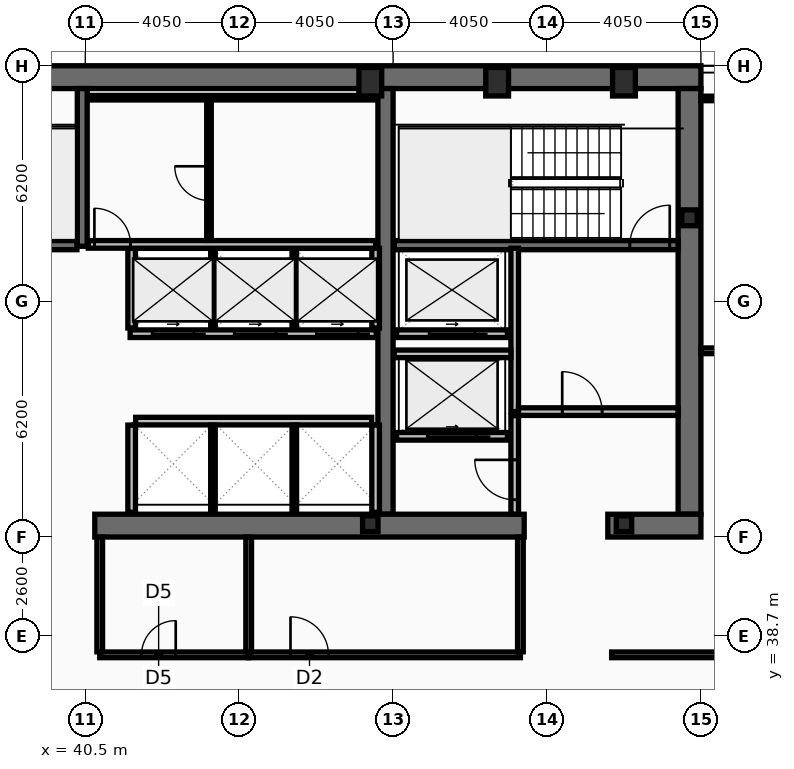
"""IFC4 building model, lengths in metres.
Left out: names, types, materials, properties, quantities, classifications, styles, units other than length and angle.
Written with IfcOpenShell. Run it as: python <this file> out.ifc"""

import sys

from ifc_helpers import new_model, si_unit, direction, frame, frame_2d, origin, origin_2d, place, context, subcontext, project, spatial, rectangle, hollow_rectangle, i_section, extrude, element, fill, save


model = new_model("IFC4")
c1 = context("Model", 3, precision=1e-05, world=origin(), true_north=direction((0.0, 1.0)))
c2 = subcontext(c1, "Body", "Model", "MODEL_VIEW")
j1 = project(units=[si_unit("LENGTHUNIT", "METRE"), si_unit("PLANEANGLEUNIT", "RADIAN")], contexts=[c1])
p1 = place(None, origin())
s1 = spatial("IfcSite", under=j1, at=p1, CompositionType="ELEMENT")
p2 = place(p1, origin())
s2 = spatial("IfcBuilding", under=s1, at=p2, CompositionType="ELEMENT")
p3 = place(p2, frame((0.0, 0.0, 188.6)))
s3 = spatial("IfcBuildingStorey", under=s2, at=p3, CompositionType="ELEMENT", Elevation=188.6)
p4 = place(p3, frame((16.2, 53.4, 0.0), z_axis=(0.0, 0.0, 1.0), x_axis=(1.0, 0.0, 0.0)))
e1 = element("IfcWall", 1, at=p4, inside=s3, PredefinedType="SHEAR", context=c2, shape_type="SweptSolid", body=[
    extrude(rectangle(XDim=40.5, YDim=0.6, at=frame_2d((20.25, 0.0))), origin(), (0.0, 0.0, 1.0), 3.44),
])
p5 = place(p3, frame((56.4, 53.1, 0.0), z_axis=(0.0, 0.0, 1.0), x_axis=(0.0, -1.0, 0.0)))
e2 = element("IfcWall", 2, at=p5, inside=s3, PredefinedType="SHEAR", context=c2, shape_type="SweptSolid", body=[
    extrude(rectangle(XDim=11.2, YDim=0.6, at=frame_2d((5.6, 0.0))), origin(), (0.0, 0.0, 1.0), 3.44),
])
p6 = place(p3, frame((48.4, 41.9, 0.0), z_axis=(0.0, 0.0, 1.0), x_axis=(0.0, 1.0, 0.0)))
e3 = element("IfcWall", 3, at=p6, inside=s3, PredefinedType="SHEAR", context=c2, shape_type="SweptSolid", body=[
    extrude(rectangle(XDim=11.2, YDim=0.4, at=frame_2d((5.6, 0.0))), origin(), (0.0, 0.0, 1.0), 3.44),
])
p7 = place(p3, frame((52.05, 41.6, 0.0), z_axis=(0.0, 0.0, 1.0), x_axis=(-1.0, 0.0, 0.0)))
e4 = element("IfcWall", 4, at=p7, inside=s3, PredefinedType="SHEAR", context=c2, shape_type="SweptSolid", body=[
    extrude(rectangle(XDim=11.3, YDim=0.6, at=frame_2d((5.65, 0.0))), origin(), (0.0, 0.0, 1.0), 3.44),
])
p8 = place(p3, frame((56.7, 41.6, 0.0), z_axis=(0.0, 0.0, 1.0), x_axis=(-1.0, 0.0, 0.0)))
e5 = element("IfcWall", 5, at=p8, inside=s3, PredefinedType="SHEAR", context=c2, shape_type="SweptSolid", body=[
    extrude(rectangle(XDim=2.45, YDim=0.6, at=frame_2d((1.225, 0.0))), origin(), (0.0, 0.0, 1.0), 3.44),
])
p9 = place(p3, frame((40.42, 48.95, 0.0), z_axis=(0.0, 0.0, 1.0), x_axis=(0.0, 1.0, 0.0)))
e6 = element("IfcWall", 6, at=p9, inside=s3, PredefinedType="SHEAR", context=c2, shape_type="SweptSolid", body=[
    extrude(rectangle(XDim=4.15, YDim=0.26, at=frame_2d((2.075, 0.0))), origin(), (0.0, 0.0, 1.0), 3.44),
])
p10 = place(p3, frame((48.63, 48.98, 0.0), z_axis=(0.0, 0.0, 1.0), x_axis=(1.0, 0.0, 0.0)))
e7 = element("IfcWall", 7, at=p10, inside=s3, PredefinedType="SHEAR", context=c2, shape_type="SweptSolid", body=[
    extrude(rectangle(XDim=7.47, YDim=0.24, at=frame_2d((3.735, 0.0))), origin(), (0.0, 0.0, 1.0), 3.44),
])
p11 = place(p10, frame((6.2, 0.0, 0.0)))
e8 = element("IfcOpeningElement", 8, at=p11, cuts=e7, PredefinedType="OPENING", context=c2, shape_type="SweptSolid", body=[
    extrude(rectangle(XDim=1.05, YDim=2.15, at=frame_2d((0.525, 1.075))), frame((0.0, 0.13, 0.0), z_axis=(0.0, -1.0, 0.0), x_axis=(1.0, 0.0, 0.0)), (0.0, 0.0, 1.0), 0.26),
])
p12 = place(p3, frame((32.72, 48.98, 0.0), z_axis=(0.0, 0.0, 1.0), x_axis=(1.0, 0.0, 0.0)))
e9 = element("IfcWall", 9, at=p12, inside=s3, PredefinedType="SHEAR", context=c2, shape_type="SweptSolid", body=[
    extrude(rectangle(XDim=7.56, YDim=0.24, at=frame_2d((3.78, 0.0))), origin(), (0.0, 0.0, 1.0), 3.44),
])
p13 = place(p12, frame((0.22, 0.0, 0.0)))
e10 = element("IfcOpeningElement", 10, at=p13, cuts=e9, PredefinedType="OPENING", context=c2, shape_type="SweptSolid", body=[
    extrude(rectangle(XDim=1.05, YDim=2.15, at=frame_2d((0.525, 1.075))), frame((0.0, 0.13, 0.0), z_axis=(0.0, -1.0, 0.0), x_axis=(1.0, 0.0, 0.0)), (0.0, 0.0, 1.0), 0.26),
])
for number, where, z_axis, x_axis in (
    (11, (48.0, 53.28, 0.0), (0.0, 0.0, 1.0), (1.0, 0.0, 0.0)),
    (12, (51.337, 53.28, 0.0), (0.0, 0.0, 1.0), (1.0, 0.0, 0.0)),
    (13, (54.675, 53.28, 0.0), (0.0, 0.0, 1.0), (1.0, 0.0, 0.0)),
):
    element("IfcColumn", number, at=place(p3, frame(where, z_axis=z_axis, x_axis=x_axis)), inside=s3, PredefinedType="COLUMN", context=c2, shape_type="SweptSolid", body=[
        extrude(hollow_rectangle(XDim=0.6, YDim=0.75, WallThickness=0.045, at=origin_2d()), origin(), (0.0, 0.0, 1.0), 3.6),
    ])
for number, where, z_axis, x_axis in (
    (14, (56.4, 49.7, 0.0), (0.0, 0.0, 1.0), (1.0, 0.0, 0.0)),
    (15, (48.0, 41.65, 0.0), (0.0, 0.0, 1.0), (1.0, 0.0, 0.0)),
    (16, (54.675, 41.65, 0.0), (0.0, 0.0, 1.0), (1.0, 0.0, 0.0)),
):
    element("IfcColumn", number, at=place(p3, frame(where, z_axis=z_axis, x_axis=x_axis)), inside=s3, PredefinedType="COLUMN", context=c2, shape_type="SweptSolid", body=[
        extrude(i_section(OverallWidth=0.406, OverallDepth=0.416, WebThickness=0.03, FlangeThickness=0.048, at=origin_2d()), origin(), (0.0, 0.0, 1.0), 3.6),
    ])
p14 = place(p3, frame((51.61, 43.95, 0.0), z_axis=(0.0, 0.0, 1.0), x_axis=(-1.0, 0.0, 0.0)))
e17 = element("IfcWall", 17, at=p14, inside=s3, PredefinedType="PARTITIONING", context=c2, shape_type="SweptSolid", body=[
    extrude(rectangle(XDim=2.92, YDim=0.2, at=frame_2d((1.46, 0.0))), origin(), (0.0, 0.0, 1.0), 3.44),
])
p15 = place(p14, frame((0.81, 0.0, 0.0)))
e18 = element("IfcOpeningElement", 18, at=p15, cuts=e17, PredefinedType="OPENING", context=c2, shape_type="SweptSolid", body=[
    extrude(rectangle(XDim=1.3, YDim=2.18, at=frame_2d((0.65, 1.09))), frame((0.0, 0.11, 0.0), z_axis=(0.0, -1.0, 0.0), x_axis=(1.0, 0.0, 0.0)), (0.0, 0.0, 1.0), 0.22),
])
p16 = place(p3, frame((51.61, 46.65, 0.0), z_axis=(0.0, 0.0, 1.0), x_axis=(-1.0, 0.0, 0.0)))
e19 = element("IfcWall", 19, at=p16, inside=s3, PredefinedType="PARTITIONING", context=c2, shape_type="SweptSolid", body=[
    extrude(rectangle(XDim=2.92, YDim=0.2, at=frame_2d((1.46, 0.0))), origin(), (0.0, 0.0, 1.0), 3.44),
])
p17 = place(p16, frame((0.86, 0.0, 0.0)))
e20 = element("IfcOpeningElement", 20, at=p17, cuts=e19, PredefinedType="OPENING", context=c2, shape_type="SweptSolid", body=[
    extrude(rectangle(XDim=1.2, YDim=2.18, at=frame_2d((0.6, 1.09))), frame((0.0, 0.11, 0.0), z_axis=(0.0, -1.0, 0.0), x_axis=(1.0, 0.0, 0.0)), (0.0, 0.0, 1.0), 0.22),
])
p18 = place(p3, frame((48.16, 46.65, 0.0), z_axis=(0.0, 0.0, 1.0), x_axis=(-1.0, 0.0, 0.0)))
e21 = element("IfcWall", 21, at=p18, inside=s3, PredefinedType="PARTITIONING", context=c2, shape_type="SweptSolid", body=[
    extrude(rectangle(XDim=6.48, YDim=0.2, at=frame_2d((3.24, 0.0))), origin(), (0.0, 0.0, 1.0), 3.44),
])
p19 = place(p18, frame((4.8, 0.0, 0.0)))
e22 = element("IfcOpeningElement", 22, at=p19, cuts=e21, PredefinedType="OPENING", context=c2, shape_type="SweptSolid", body=[
    extrude(rectangle(XDim=1.1, YDim=2.18, at=frame_2d((0.55, 1.09))), frame((0.0, 0.11, 0.0), z_axis=(0.0, -1.0, 0.0), x_axis=(1.0, 0.0, 0.0)), (0.0, 0.0, 1.0), 0.22),
])
p20 = place(p18, frame((2.64, 0.0, 0.0)))
e23 = element("IfcOpeningElement", 23, at=p20, cuts=e21, PredefinedType="OPENING", context=c2, shape_type="SweptSolid", body=[
    extrude(rectangle(XDim=1.1, YDim=2.18, at=frame_2d((0.55, 1.09))), frame((0.0, 0.11, 0.0), z_axis=(0.0, -1.0, 0.0), x_axis=(1.0, 0.0, 0.0)), (0.0, 0.0, 1.0), 0.22),
])
p21 = place(p18, frame((0.48, 0.0, 0.0)))
e24 = element("IfcOpeningElement", 24, at=p21, cuts=e21, PredefinedType="OPENING", context=c2, shape_type="SweptSolid", body=[
    extrude(rectangle(XDim=1.1, YDim=2.18, at=frame_2d((0.55, 1.09))), frame((0.0, 0.11, 0.0), z_axis=(0.0, -1.0, 0.0), x_axis=(1.0, 0.0, 0.0)), (0.0, 0.0, 1.0), 0.22),
])
p22 = place(p3, frame((51.8, 44.6, 0.0), z_axis=(0.0, 0.0, 1.0), x_axis=(0.0, 1.0, 0.0)))
e25 = element("IfcWall", 25, at=p22, inside=s3, PredefinedType="PARTITIONING", context=c2, shape_type="SweptSolid", body=[
    extrude(rectangle(XDim=4.3, YDim=0.2, at=frame_2d((2.15, 0.0))), origin(), (0.0, 0.0, 1.0), 3.44),
])
p23 = place(p3, frame((51.9, 44.6, 0.0), z_axis=(0.0, 0.0, 1.0), x_axis=(1.0, 0.0, 0.0)))
e26 = element("IfcWall", 26, at=p23, inside=s3, PredefinedType="PARTITIONING", context=c2, shape_type="SweptSolid", body=[
    extrude(rectangle(XDim=4.2, YDim=0.2, at=frame_2d((2.1, 0.0))), origin(), (0.0, 0.0, 1.0), 3.44),
])
p24 = place(p23, frame((1.15, 0.0, 0.0)))
e27 = element("IfcOpeningElement", 27, at=p24, cuts=e26, PredefinedType="OPENING", context=c2, shape_type="SweptSolid", body=[
    extrude(rectangle(XDim=1.05, YDim=2.15, at=frame_2d((0.525, 1.075))), frame((0.0, 0.11, 0.0), z_axis=(0.0, -1.0, 0.0), x_axis=(1.0, 0.0, 0.0)), (0.0, 0.0, 1.0), 0.22),
])
p25 = place(p3, frame((48.63, 46.12, 0.0), z_axis=(0.0, 0.0, 1.0), x_axis=(1.0, 0.0, 0.0)))
e28 = element("IfcWall", 28, at=p25, inside=s3, PredefinedType="PARTITIONING", context=c2, shape_type="SweptSolid", body=[
    extrude(rectangle(XDim=3.07, YDim=0.2, at=frame_2d((1.535, 0.0))), origin(), (0.0, 0.0, 1.0), 3.44),
])
p26 = place(p3, frame((51.8, 41.9, 0.0), z_axis=(0.0, 0.0, 1.0), x_axis=(0.0, 1.0, 0.0)))
e29 = element("IfcWall", 29, at=p26, inside=s3, PredefinedType="PARTITIONING", context=c2, shape_type="SweptSolid", body=[
    extrude(rectangle(XDim=2.595, YDim=0.2, at=frame_2d((1.298, 0.0))), origin(), (0.0, 0.0, 1.0), 3.44),
])
p27 = place(p26, frame((0.38, 0.0, 0.0)))
e30 = element("IfcOpeningElement", 30, at=p27, cuts=e29, PredefinedType="OPENING", context=c2, shape_type="SweptSolid", body=[
    extrude(rectangle(XDim=1.05, YDim=2.15, at=frame_2d((0.525, 1.075))), frame((0.0, 0.11, 0.0), z_axis=(0.0, -1.0, 0.0), x_axis=(1.0, 0.0, 0.0)), (0.0, 0.0, 1.0), 0.22),
])
for number, where, z_axis, x_axis in (
    (31, (41.72, 46.8, 0.0), (0.0, 0.0, 1.0), (0.0, 1.0, 0.0)),
    (32, (48.14, 46.8, 0.0), (0.0, 0.0, 1.0), (0.0, 1.0, 0.0)),
):
    element("IfcWall", number, at=place(p3, frame(where, z_axis=z_axis, x_axis=x_axis)), inside=s3, PredefinedType="PARTITIONING", context=c2, shape_type="SweptSolid", body=[
        extrude(rectangle(XDim=2.095, YDim=0.2, at=frame_2d((1.047, 0.0))), origin(), (0.0, 0.0, 1.0), 3.44),
    ])
for number, where, z_axis, x_axis in (
    (33, (43.86, 46.8, 0.0), (0.0, 0.0, 1.0), (0.0, 1.0, 0.0)),
    (34, (46.0, 46.8, 0.0), (0.0, 0.0, 1.0), (0.0, 1.0, 0.0)),
):
    element("IfcWall", number, at=place(p3, frame(where, z_axis=z_axis, x_axis=x_axis)), inside=s3, PredefinedType="PARTITIONING", context=c2, shape_type="SweptSolid", body=[
        extrude(rectangle(XDim=2.095, YDim=0.12, at=frame_2d((1.047, 0.0))), origin(), (0.0, 0.0, 1.0), 3.44),
    ])
p28 = place(p3, frame((41.825, 44.35, 0.0), z_axis=(0.0, 0.0, 1.0), x_axis=(1.0, 0.0, 0.0)))
e35 = element("IfcWall", 35, at=p28, inside=s3, PredefinedType="PARTITIONING", context=c2, shape_type="SweptSolid", body=[
    extrude(rectangle(XDim=6.21, YDim=0.2, at=frame_2d((3.105, 0.0))), origin(), (0.0, 0.0, 1.0), 3.44),
])
for number, where, z_axis, x_axis in (
    (36, (41.72, 41.95, 0.0), (0.0, 0.0, 1.0), (0.0, 1.0, 0.0)),
    (37, (48.14, 41.95, 0.0), (0.0, 0.0, 1.0), (0.0, 1.0, 0.0)),
):
    element("IfcWall", number, at=place(p3, frame(where, z_axis=z_axis, x_axis=x_axis)), inside=s3, PredefinedType="PARTITIONING", context=c2, shape_type="SweptSolid", body=[
        extrude(rectangle(XDim=2.295, YDim=0.2, at=frame_2d((1.147, 0.0))), origin(), (0.0, 0.0, 1.0), 3.44),
    ])
for number, where, z_axis, x_axis in (
    (38, (43.86, 41.95, 0.0), (0.0, 0.0, 1.0), (0.0, 1.0, 0.0)),
    (39, (46.0, 41.95, 0.0), (0.0, 0.0, 1.0), (0.0, 1.0, 0.0)),
):
    element("IfcWall", number, at=place(p3, frame(where, z_axis=z_axis, x_axis=x_axis)), inside=s3, PredefinedType="PARTITIONING", context=c2, shape_type="SweptSolid", body=[
        extrude(rectangle(XDim=2.295, YDim=0.12, at=frame_2d((1.147, 0.0))), origin(), (0.0, 0.0, 1.0), 3.44),
    ])
p29 = place(p3, frame((40.58, 52.86, 0.0), z_axis=(0.0, 0.0, 1.0), x_axis=(1.0, 0.0, 0.0)))
e40 = element("IfcWall", 40, at=p29, inside=s3, PredefinedType="PARTITIONING", context=c2, shape_type="SweptSolid", body=[
    extrude(rectangle(XDim=7.56, YDim=0.12, at=frame_2d((3.78, 0.0))), origin(), (0.0, 0.0, 1.0), 3.44),
])
p30 = place(p3, frame((40.58, 49.0, 0.0), z_axis=(0.0, 0.0, 1.0), x_axis=(1.0, 0.0, 0.0)))
e41 = element("IfcWall", 41, at=p30, inside=s3, PredefinedType="PARTITIONING", context=c2, shape_type="SweptSolid", body=[
    extrude(rectangle(XDim=7.56, YDim=0.2, at=frame_2d((3.78, 0.0))), origin(), (0.0, 0.0, 1.0), 3.44),
])
p31 = place(p30, frame((0.16, 0.0, 0.0)))
e42 = element("IfcOpeningElement", 42, at=p31, cuts=e41, PredefinedType="OPENING", context=c2, shape_type="SweptSolid", body=[
    extrude(rectangle(XDim=0.95, YDim=2.1, at=frame_2d((0.475, 1.05))), frame((0.0, 0.11, 0.0), z_axis=(0.0, -1.0, 0.0), x_axis=(1.0, 0.0, 0.0)), (0.0, 0.0, 1.0), 0.22),
])
p32 = place(p3, frame((43.755, 49.105, 0.0), z_axis=(0.0, 0.0, 1.0), x_axis=(0.0, 1.0, 0.0)))
e43 = element("IfcWall", 43, at=p32, inside=s3, PredefinedType="PARTITIONING", context=c2, shape_type="SweptSolid", body=[
    extrude(rectangle(XDim=3.69, YDim=0.12, at=frame_2d((1.845, 0.0))), origin(), (0.0, 0.0, 1.0), 3.44),
])
p33 = place(p32, frame((1.05, 0.0, 0.0)))
e44 = element("IfcOpeningElement", 44, at=p33, cuts=e43, PredefinedType="OPENING", context=c2, shape_type="SweptSolid", body=[
    extrude(rectangle(XDim=0.9, YDim=2.05, at=frame_2d((0.45, 1.025))), frame((0.0, 0.07, 0.0), z_axis=(0.0, -1.0, 0.0), x_axis=(1.0, 0.0, 0.0)), (0.0, 0.0, 1.0), 0.14),
])
p34 = place(p3, frame((40.88, 38.2, 0.0), z_axis=(0.0, 0.0, 1.0), x_axis=(1.0, 0.0, 0.0)))
e45 = element("IfcWall", 45, at=p34, inside=s3, PredefinedType="PARTITIONING", context=c2, shape_type="SweptSolid", body=[
    extrude(rectangle(XDim=3.92, YDim=0.15, at=frame_2d((1.96, 0.0))), origin(), (0.0, 0.0, 1.0), 2.73),
])
p35 = place(p34, frame((1.1, 0.0, 0.0)))
e46 = element("IfcOpeningElement", 46, at=p35, cuts=e45, PredefinedType="OPENING", context=c2, shape_type="SweptSolid", body=[
    extrude(rectangle(XDim=0.9, YDim=2.05, at=frame_2d((0.45, 1.025))), frame((0.0, 0.085, 0.0), z_axis=(0.0, -1.0, 0.0), x_axis=(1.0, 0.0, 0.0)), (0.0, 0.0, 1.0), 0.17),
])
p36 = place(p3, frame((44.8, 38.2, 0.0), z_axis=(0.0, 0.0, 1.0), x_axis=(1.0, 0.0, 0.0)))
e47 = element("IfcWall", 47, at=p36, inside=s3, PredefinedType="PARTITIONING", context=c2, shape_type="SweptSolid", body=[
    extrude(rectangle(XDim=7.15, YDim=0.15, at=frame_2d((3.575, 0.0))), origin(), (0.0, 0.0, 1.0), 2.73),
])
p37 = place(p36, frame((1.1, 0.0, 0.0)))
e48 = element("IfcOpeningElement", 48, at=p37, cuts=e47, PredefinedType="OPENING", context=c2, shape_type="SweptSolid", body=[
    extrude(rectangle(XDim=1.0, YDim=2.05, at=frame_2d((0.5, 1.025))), frame((0.0, 0.085, 0.0), z_axis=(0.0, -1.0, 0.0), x_axis=(1.0, 0.0, 0.0)), (0.0, 0.0, 1.0), 0.17),
])
for number, where, z_axis, x_axis in (
    (49, (40.88, 38.28, 0.0), (0.0, 0.0, 1.0), (0.0, 1.0, 0.0)),
    (50, (44.8, 38.28, 0.0), (0.0, 0.0, 1.0), (0.0, 1.0, 0.0)),
    (51, (51.95, 38.28, 0.0), (0.0, 0.0, 1.0), (0.0, 1.0, 0.0)),
):
    element("IfcWall", number, at=place(p3, frame(where, z_axis=z_axis, x_axis=x_axis)), inside=s3, PredefinedType="PARTITIONING", context=c2, shape_type="SweptSolid", body=[
        extrude(rectangle(XDim=3.02, YDim=0.15, at=frame_2d((1.51, 0.0))), origin(), (0.0, 0.0, 1.0), 3.44),
    ])
p38 = place(p3, frame((54.35, 38.2, 0.0), z_axis=(0.0, 0.0, 1.0), x_axis=(1.0, 0.0, 0.0)))
e52 = element("IfcWall", 52, at=p38, inside=s3, PredefinedType="PARTITIONING", context=c2, shape_type="SweptSolid", body=[
    extrude(rectangle(XDim=10.52, YDim=0.15, at=frame_2d((5.26, 0.0))), origin(), (0.0, 0.0, 1.0), 2.73),
])
p39 = place(p38, frame((3.25, 0.0, 0.0)))
e53 = element("IfcOpeningElement", 53, at=p39, cuts=e52, PredefinedType="OPENING", context=c2, shape_type="SweptSolid", body=[
    extrude(rectangle(XDim=0.95, YDim=2.05, at=frame_2d((0.475, 1.025))), frame((0.0, 0.085, 0.0), z_axis=(0.0, -1.0, 0.0), x_axis=(1.0, 0.0, 0.0)), (0.0, 0.0, 1.0), 0.17),
])
p40 = place(p3, frame((56.7, 46.2, 0.0), z_axis=(0.0, 0.0, 1.0), x_axis=(1.0, 0.0, 0.0)))
e54 = element("IfcWall", 54, at=p40, inside=s3, PredefinedType="PARTITIONING", context=c2, shape_type="SweptSolid", body=[
    extrude(rectangle(XDim=8.105, YDim=0.15, at=frame_2d((4.052, 0.0))), origin(), (0.0, 0.0, 1.0), 2.83),
])
p41 = place(p40, frame((0.9, 0.0, 0.0)))
e55 = element("IfcOpeningElement", 55, at=p41, cuts=e54, PredefinedType="OPENING", context=c2, shape_type="SweptSolid", body=[
    extrude(rectangle(XDim=0.9, YDim=2.05, at=frame_2d((0.45, 1.025))), frame((0.0, 0.085, 0.0), z_axis=(0.0, -1.0, 0.0), x_axis=(1.0, 0.0, 0.0)), (0.0, 0.0, 1.0), 0.17),
])
p42 = place(p3, frame((56.7, 52.84, 0.0), z_axis=(0.0, 0.0, 1.0), x_axis=(1.0, 0.0, 0.0)))
e56 = element("IfcWall", 56, at=p42, inside=s3, PredefinedType="PARTITIONING", context=c2, shape_type="SweptSolid", body=[
    extrude(rectangle(XDim=8.105, YDim=0.12, at=frame_2d((4.052, 0.0))), origin(), (0.0, 0.0, 1.0), 3.44),
])
p43 = place(p11, origin())
e57 = element("IfcDoor", 57, at=p43, inside=s3, OperationType="SINGLE_SWING_RIGHT", PredefinedType="DOOR", context=c2, shape_type="SweptSolid", body=[
    extrude(rectangle(XDim=1.05, YDim=2.15, at=frame_2d((0.525, 1.075))), frame((0.0, 0.025, 0.0), z_axis=(0.0, -1.0, 0.0), x_axis=(1.0, 0.0, 0.0)), (0.0, 0.0, 1.0), 0.05),
])
fill(e8, e57)
p44 = place(p15, origin())
e58 = element("IfcDoor", 58, at=p44, inside=s3, OperationType="SLIDING_TO_LEFT", PredefinedType="DOOR", context=c2, shape_type="SweptSolid", body=[
    extrude(rectangle(XDim=1.3, YDim=2.18, at=frame_2d((0.65, 1.09))), frame((0.0, 0.025, 0.0), z_axis=(0.0, -1.0, 0.0), x_axis=(1.0, 0.0, 0.0)), (0.0, 0.0, 1.0), 0.05),
])
fill(e18, e58)
p45 = place(p17, origin())
e59 = element("IfcDoor", 59, at=p45, inside=s3, OperationType="SLIDING_TO_LEFT", PredefinedType="DOOR", context=c2, shape_type="SweptSolid", body=[
    extrude(rectangle(XDim=1.2, YDim=2.18, at=frame_2d((0.6, 1.09))), frame((0.0, 0.025, 0.0), z_axis=(0.0, -1.0, 0.0), x_axis=(1.0, 0.0, 0.0)), (0.0, 0.0, 1.0), 0.05),
])
fill(e20, e59)
p46 = place(p19, origin())
e60 = element("IfcDoor", 60, at=p46, inside=s3, OperationType="SLIDING_TO_LEFT", PredefinedType="DOOR", context=c2, shape_type="SweptSolid", body=[
    extrude(rectangle(XDim=1.1, YDim=2.18, at=frame_2d((0.55, 1.09))), frame((0.0, 0.025, 0.0), z_axis=(0.0, -1.0, 0.0), x_axis=(1.0, 0.0, 0.0)), (0.0, 0.0, 1.0), 0.05),
])
fill(e22, e60)
p47 = place(p20, origin())
e61 = element("IfcDoor", 61, at=p47, inside=s3, OperationType="SLIDING_TO_LEFT", PredefinedType="DOOR", context=c2, shape_type="SweptSolid", body=[
    extrude(rectangle(XDim=1.1, YDim=2.18, at=frame_2d((0.55, 1.09))), frame((0.0, 0.025, 0.0), z_axis=(0.0, -1.0, 0.0), x_axis=(1.0, 0.0, 0.0)), (0.0, 0.0, 1.0), 0.05),
])
fill(e23, e61)
p48 = place(p21, origin())
e62 = element("IfcDoor", 62, at=p48, inside=s3, OperationType="SLIDING_TO_LEFT", PredefinedType="DOOR", context=c2, shape_type="SweptSolid", body=[
    extrude(rectangle(XDim=1.1, YDim=2.18, at=frame_2d((0.55, 1.09))), frame((0.0, 0.025, 0.0), z_axis=(0.0, -1.0, 0.0), x_axis=(1.0, 0.0, 0.0)), (0.0, 0.0, 1.0), 0.05),
])
fill(e24, e62)
p49 = place(p24, origin())
e63 = element("IfcDoor", 63, at=p49, inside=s3, OperationType="SINGLE_SWING_LEFT", PredefinedType="DOOR", context=c2, shape_type="SweptSolid", body=[
    extrude(rectangle(XDim=1.05, YDim=2.15, at=frame_2d((0.525, 1.075))), frame((0.0, 0.025, 0.0), z_axis=(0.0, -1.0, 0.0), x_axis=(1.0, 0.0, 0.0)), (0.0, 0.0, 1.0), 0.05),
])
fill(e27, e63)
p50 = place(p27, origin())
e64 = element("IfcDoor", 64, at=p50, inside=s3, OperationType="SINGLE_SWING_RIGHT", PredefinedType="DOOR", context=c2, shape_type="SweptSolid", body=[
    extrude(rectangle(XDim=1.05, YDim=2.15, at=frame_2d((0.525, 1.075))), frame((0.0, 0.025, 0.0), z_axis=(0.0, -1.0, 0.0), x_axis=(1.0, 0.0, 0.0)), (0.0, 0.0, 1.0), 0.05),
])
fill(e30, e64)
p51 = place(p31, origin())
e65 = element("IfcDoor", 65, at=p51, inside=s3, OperationType="SINGLE_SWING_LEFT", PredefinedType="DOOR", context=c2, shape_type="SweptSolid", body=[
    extrude(rectangle(XDim=0.95, YDim=2.1, at=frame_2d((0.475, 1.05))), frame((0.0, 0.025, 0.0), z_axis=(0.0, -1.0, 0.0), x_axis=(1.0, 0.0, 0.0)), (0.0, 0.0, 1.0), 0.05),
])
fill(e42, e65)
p52 = place(p33, origin())
e66 = element("IfcDoor", 66, at=p52, inside=s3, OperationType="SINGLE_SWING_RIGHT", PredefinedType="DOOR", context=c2, shape_type="SweptSolid", body=[
    extrude(rectangle(XDim=0.9, YDim=2.05, at=frame_2d((0.45, 1.025))), frame((0.0, 0.025, 0.0), z_axis=(0.0, -1.0, 0.0), x_axis=(1.0, 0.0, 0.0)), (0.0, 0.0, 1.0), 0.05),
])
fill(e44, e66)
p53 = place(p35, origin())
e67 = element("IfcDoor", 67, at=p53, inside=s3, OperationType="SINGLE_SWING_RIGHT", PredefinedType="DOOR", context=c2, shape_type="SweptSolid", body=[
    extrude(rectangle(XDim=0.9, YDim=2.05, at=frame_2d((0.45, 1.025))), frame((0.0, 0.025, 0.0), z_axis=(0.0, -1.0, 0.0), x_axis=(1.0, 0.0, 0.0)), (0.0, 0.0, 1.0), 0.05),
])
fill(e46, e67)
p54 = place(p37, origin())
e68 = element("IfcDoor", 68, at=p54, inside=s3, OperationType="SINGLE_SWING_LEFT", PredefinedType="DOOR", context=c2, shape_type="SweptSolid", body=[
    extrude(rectangle(XDim=1.0, YDim=2.05, at=frame_2d((0.5, 1.025))), frame((0.0, 0.025, 0.0), z_axis=(0.0, -1.0, 0.0), x_axis=(1.0, 0.0, 0.0)), (0.0, 0.0, 1.0), 0.05),
])
fill(e48, e68)
save(model, sys.argv[1])
